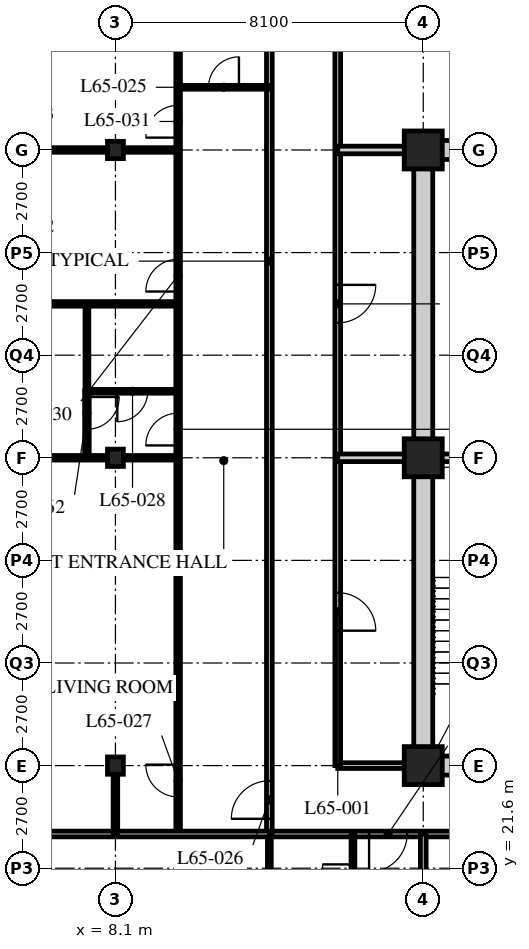
"""IFC4 building model, lengths in metres.
Left out: names, types, materials, properties, quantities, classifications, styles, units other than length and angle.
Written with IfcOpenShell. Run it as: python <this file> out.ifc"""

import sys

from ifc_helpers import new_model, si_unit, direction, frame, frame_2d, origin, origin_2d, place, context, subcontext, project, spatial, rectangle, hollow_rectangle, i_section, extrude, element, fill, save


model = new_model("IFC4")
c1 = context("Model", 3, precision=1e-05, world=origin(), true_north=direction((0.0, 1.0)))
c2 = subcontext(c1, "Body", "Model", "MODEL_VIEW")
j1 = project(units=[si_unit("LENGTHUNIT", "METRE"), si_unit("PLANEANGLEUNIT", "RADIAN")], contexts=[c1])
p1 = place(None, origin())
s1 = spatial("IfcSite", under=j1, at=p1, CompositionType="ELEMENT")
p2 = place(p1, origin())
s2 = spatial("IfcBuilding", under=s1, at=p2, CompositionType="ELEMENT")
p3 = place(p2, frame((0.0, 0.0, 254.1)))
s3 = spatial("IfcBuildingStorey", under=s2, at=p3, CompositionType="ELEMENT", Elevation=254.1)
for number, where, z_axis, x_axis in (
    (1, (8.1, 24.3, 0.0), (0.0, 0.0, 1.0), (1.0, 0.0, 0.0)),
    (2, (8.1, 32.4, 0.0), (0.0, 0.0, 1.0), (1.0, 0.0, 0.0)),
    (3, (8.1, 40.5, 0.0), (0.0, 0.0, 1.0), (1.0, 0.0, 0.0)),
):
    element("IfcColumn", number, at=place(p3, frame(where, z_axis=z_axis, x_axis=x_axis)), inside=s3, PredefinedType="COLUMN", context=c2, shape_type="SweptSolid", body=[
        extrude(i_section(OverallWidth=0.418, OverallDepth=0.456, WebThickness=0.042, FlangeThickness=0.067, FilletRadius=0.015, at=origin_2d()), origin(), (0.0, 0.0, 1.0), 3.9),
    ])
for number, where, z_axis, x_axis in (
    (4, (16.2, 24.3, 0.0), (0.0, 0.0, 1.0), (1.0, 0.0, 0.0)),
    (5, (16.2, 32.4, 0.0), (0.0, 0.0, 1.0), (1.0, 0.0, 0.0)),
    (6, (16.2, 40.5, 0.0), (0.0, 0.0, 1.0), (1.0, 0.0, 0.0)),
):
    element("IfcColumn", number, at=place(p3, frame(where, z_axis=z_axis, x_axis=x_axis)), inside=s3, PredefinedType="COLUMN", context=c2, shape_type="SweptSolid", body=[
        extrude(hollow_rectangle(XDim=1.0, YDim=1.0, WallThickness=0.1, at=origin_2d()), origin(), (0.0, 0.0, 1.0), 3.9),
    ])
p4 = place(p3, frame((12.15, 22.5, 0.0), z_axis=(0.0, 0.0, 1.0), x_axis=(1.0, 0.0, 0.0)))
e7 = element("IfcWall", 7, at=p4, inside=s3, PredefinedType="PARTITIONING", context=c2, shape_type="SweptSolid", body=[
    extrude(rectangle(XDim=24.3, YDim=0.15, at=frame_2d((12.15, 0.0))), origin(), (0.0, 0.0, 1.0), 3.69),
])
p5 = place(p4, frame((6.4, 0.0, 0.0)))
e8 = element("IfcOpeningElement", 8, at=p5, cuts=e7, PredefinedType="OPENING", context=c2, shape_type="SweptSolid", body=[
    extrude(rectangle(XDim=1.0, YDim=2.1, at=frame_2d((0.5, 1.05))), frame((0.0, 0.085, 0.0), z_axis=(0.0, -1.0, 0.0), x_axis=(1.0, 0.0, 0.0)), (0.0, 0.0, 1.0), 0.17),
])
p6 = place(p4, frame((8.5, 0.0, 0.0)))
e9 = element("IfcOpeningElement", 9, at=p6, cuts=e7, PredefinedType="OPENING", context=c2, shape_type="SweptSolid", body=[
    extrude(rectangle(XDim=1.0, YDim=2.1, at=frame_2d((0.5, 1.05))), frame((0.0, 0.085, 0.0), z_axis=(0.0, -1.0, 0.0), x_axis=(1.0, 0.0, 0.0)), (0.0, 0.0, 1.0), 0.17),
])
p7 = place(p4, frame((16.6, 0.0, 0.0)))
e10 = element("IfcOpeningElement", 10, at=p7, cuts=e7, PredefinedType="OPENING", context=c2, shape_type="SweptSolid", body=[
    extrude(rectangle(XDim=1.0, YDim=2.1, at=frame_2d((0.5, 1.05))), frame((0.0, 0.085, 0.0), z_axis=(0.0, -1.0, 0.0), x_axis=(1.0, 0.0, 0.0)), (0.0, 0.0, 1.0), 0.17),
])
p8 = place(p4, frame((2.625, 0.0, 0.0)))
e11 = element("IfcOpeningElement", 11, at=p8, cuts=e7, PredefinedType="OPENING", context=c2, shape_type="SweptSolid", body=[
    extrude(rectangle(XDim=1.0, YDim=2.1, at=frame_2d((0.5, 1.05))), frame((0.0, 0.085, 0.0), z_axis=(0.0, -1.0, 0.0), x_axis=(1.0, 0.0, 0.0)), (0.0, 0.0, 1.0), 0.17),
])
p9 = place(p3, frame((12.15, 22.5, 0.0), z_axis=(0.0, 0.0, 1.0), x_axis=(0.0, 1.0, 0.0)))
e12 = element("IfcWall", 12, at=p9, inside=s3, PredefinedType="PARTITIONING", context=c2, shape_type="SweptSolid", body=[
    extrude(rectangle(XDim=30.15, YDim=0.15, at=frame_2d((15.075, 0.0))), origin(), (0.0, 0.0, 1.0), 3.69),
])
p10 = place(p9, frame((0.4, 0.0, 0.0)))
e13 = element("IfcOpeningElement", 13, at=p10, cuts=e12, PredefinedType="OPENING", context=c2, shape_type="SweptSolid", body=[
    extrude(rectangle(XDim=1.0, YDim=2.1, at=frame_2d((0.5, 1.05))), frame((0.0, 0.085, 0.0), z_axis=(0.0, -1.0, 0.0), x_axis=(1.0, 0.0, 0.0)), (0.0, 0.0, 1.0), 0.17),
])
p11 = place(p9, frame((24.4, 0.0, 0.0)))
e14 = element("IfcOpeningElement", 14, at=p11, cuts=e12, PredefinedType="OPENING", context=c2, shape_type="SweptSolid", body=[
    extrude(rectangle(XDim=1.0, YDim=2.1, at=frame_2d((0.5, 1.05))), frame((0.0, 0.085, 0.0), z_axis=(0.0, -1.0, 0.0), x_axis=(1.0, 0.0, 0.0)), (0.0, 0.0, 1.0), 0.17),
])
p12 = place(p9, frame((28.45, 0.0, 0.0)))
e15 = element("IfcOpeningElement", 15, at=p12, cuts=e12, PredefinedType="OPENING", context=c2, shape_type="SweptSolid", body=[
    extrude(rectangle(XDim=1.0, YDim=2.1, at=frame_2d((0.5, 1.05))), frame((0.0, 0.085, 0.0), z_axis=(0.0, -1.0, 0.0), x_axis=(1.0, 0.0, 0.0)), (0.0, 0.0, 1.0), 0.17),
])
p13 = place(p3, frame((16.0, 24.3, 0.0), z_axis=(0.0, 0.0, 1.0), x_axis=(-1.0, 0.0, 0.0)))
e16 = element("IfcWall", 16, at=p13, inside=s3, PredefinedType="PARTITIONING", context=c2, shape_type="SweptSolid", body=[
    extrude(rectangle(XDim=2.05, YDim=0.15, at=frame_2d((1.025, 0.0))), origin(), (0.0, 0.0, 1.0), 3.078),
])
p14 = place(p3, frame((13.95, 24.3, 0.0), z_axis=(0.0, 0.0, 1.0), x_axis=(0.0, 1.0, 0.0)))
e17 = element("IfcWall", 17, at=p14, inside=s3, PredefinedType="PARTITIONING", context=c2, shape_type="SweptSolid", body=[
    extrude(rectangle(XDim=26.55, YDim=0.15, at=frame_2d((13.275, 0.0))), origin(), (0.0, 0.0, 1.0), 3.69),
])
p15 = place(p14, frame((3.55, 0.0, 0.0)))
e18 = element("IfcOpeningElement", 18, at=p15, cuts=e17, PredefinedType="OPENING", context=c2, shape_type="SweptSolid", body=[
    extrude(rectangle(XDim=1.0, YDim=2.1, at=frame_2d((0.5, 1.05))), frame((0.0, 0.085, 0.0), z_axis=(0.0, -1.0, 0.0), x_axis=(1.0, 0.0, 0.0)), (0.0, 0.0, 1.0), 0.17),
])
p16 = place(p14, frame((11.65, 0.0, 0.0)))
e19 = element("IfcOpeningElement", 19, at=p16, cuts=e17, PredefinedType="OPENING", context=c2, shape_type="SweptSolid", body=[
    extrude(rectangle(XDim=1.0, YDim=2.1, at=frame_2d((0.5, 1.05))), frame((0.0, 0.085, 0.0), z_axis=(0.0, -1.0, 0.0), x_axis=(1.0, 0.0, 0.0)), (0.0, 0.0, 1.0), 0.17),
])
for number, where, z_axis, x_axis in (
    (20, (13.95, 32.4, 0.0), (0.0, 0.0, 1.0), (1.0, 0.0, 0.0)),
    (21, (13.95, 40.5, 0.0), (0.0, 0.0, 1.0), (1.0, 0.0, 0.0)),
):
    element("IfcWall", number, at=place(p3, frame(where, z_axis=z_axis, x_axis=x_axis)), inside=s3, PredefinedType="SOLIDWALL", context=c2, shape_type="SweptSolid", body=[
        extrude(rectangle(XDim=2.25, YDim=0.2, at=frame_2d((1.125, 0.0))), origin(), (0.0, 0.0, 1.0), 3.078),
    ])
p17 = place(p3, frame((9.75, 22.5, 0.0), z_axis=(0.0, 0.0, 1.0), x_axis=(0.0, 1.0, 0.0)))
e22 = element("IfcWall", 22, at=p17, inside=s3, PredefinedType="PARTITIONING", context=c2, shape_type="SweptSolid", body=[
    extrude(rectangle(XDim=22.05, YDim=0.12, at=frame_2d((11.025, 0.0))), origin(), (0.0, 0.0, 1.0), 3.69),
])
p18 = place(p17, frame((0.975, 0.0, 0.0)))
e23 = element("IfcOpeningElement", 23, at=p18, cuts=e22, PredefinedType="OPENING", context=c2, shape_type="SweptSolid", body=[
    extrude(rectangle(XDim=0.85, YDim=2.1, at=frame_2d((0.425, 1.05))), frame((0.0, 0.07, 0.0), z_axis=(0.0, -1.0, 0.0), x_axis=(1.0, 0.0, 0.0)), (0.0, 0.0, 1.0), 0.14),
])
p19 = place(p17, frame((10.225, 0.0, 0.0)))
e24 = element("IfcOpeningElement", 24, at=p19, cuts=e22, PredefinedType="OPENING", context=c2, shape_type="SweptSolid", body=[
    extrude(rectangle(XDim=0.85, YDim=2.1, at=frame_2d((0.425, 1.05))), frame((0.0, 0.07, 0.0), z_axis=(0.0, -1.0, 0.0), x_axis=(1.0, 0.0, 0.0)), (0.0, 0.0, 1.0), 0.14),
])
p20 = place(p17, frame((14.275, 0.0, 0.0)))
e25 = element("IfcOpeningElement", 25, at=p20, cuts=e22, PredefinedType="OPENING", context=c2, shape_type="SweptSolid", body=[
    extrude(rectangle(XDim=0.85, YDim=2.1, at=frame_2d((0.425, 1.05))), frame((0.0, 0.07, 0.0), z_axis=(0.0, -1.0, 0.0), x_axis=(1.0, 0.0, 0.0)), (0.0, 0.0, 1.0), 0.14),
])
p21 = place(p17, frame((18.325, 0.0, 0.0)))
e26 = element("IfcOpeningElement", 26, at=p21, cuts=e22, PredefinedType="OPENING", context=c2, shape_type="SweptSolid", body=[
    extrude(rectangle(XDim=0.85, YDim=2.1, at=frame_2d((0.425, 1.05))), frame((0.0, 0.07, 0.0), z_axis=(0.0, -1.0, 0.0), x_axis=(1.0, 0.0, 0.0)), (0.0, 0.0, 1.0), 0.14),
])
p22 = place(p3, frame((12.15, 42.15, 0.0), z_axis=(0.0, 0.0, 1.0), x_axis=(-1.0, 0.0, 0.0)))
e27 = element("IfcWall", 27, at=p22, inside=s3, PredefinedType="PARTITIONING", context=c2, shape_type="SweptSolid", body=[
    extrude(rectangle(XDim=2.4, YDim=0.1, at=frame_2d((1.2, 0.0))), origin(), (0.0, 0.0, 1.0), 3.69),
])
p23 = place(p22, frame((0.8, 0.0, 0.0)))
e28 = element("IfcOpeningElement", 28, at=p23, cuts=e27, PredefinedType="OPENING", context=c2, shape_type="SweptSolid", body=[
    extrude(rectangle(XDim=0.8, YDim=2.1, at=frame_2d((0.4, 1.05))), frame((0.0, 0.06, 0.0), z_axis=(0.0, -1.0, 0.0), x_axis=(1.0, 0.0, 0.0)), (0.0, 0.0, 1.0), 0.12),
])
p24 = place(p3, frame((9.75, 34.15, 0.0), z_axis=(0.0, 0.0, 1.0), x_axis=(-1.0, 0.0, 0.0)))
e29 = element("IfcWall", 29, at=p24, inside=s3, PredefinedType="PARTITIONING", context=c2, shape_type="SweptSolid", body=[
    extrude(rectangle(XDim=2.4, YDim=0.1, at=frame_2d((1.2, 0.0))), origin(), (0.0, 0.0, 1.0), 3.69),
])
p25 = place(p24, frame((0.8, 0.0, 0.0)))
e30 = element("IfcOpeningElement", 30, at=p25, cuts=e29, PredefinedType="OPENING", context=c2, shape_type="SweptSolid", body=[
    extrude(rectangle(XDim=0.8, YDim=2.1, at=frame_2d((0.4, 1.05))), frame((0.0, 0.06, 0.0), z_axis=(0.0, -1.0, 0.0), x_axis=(1.0, 0.0, 0.0)), (0.0, 0.0, 1.0), 0.12),
])
p26 = place(p3, frame((7.35, 34.15, 0.0), z_axis=(0.0, 0.0, 1.0), x_axis=(0.0, 1.0, 0.0)))
e31 = element("IfcWall", 31, at=p26, inside=s3, PredefinedType="PARTITIONING", context=c2, shape_type="SweptSolid", body=[
    extrude(rectangle(XDim=2.3, YDim=0.1, at=frame_2d((1.15, 0.0))), origin(), (0.0, 0.0, 1.0), 3.69),
])
p27 = place(p3, frame((9.75, 32.4, 0.0), z_axis=(0.0, 0.0, 1.0), x_axis=(-1.0, 0.0, 0.0)))
e32 = element("IfcWall", 32, at=p27, inside=s3, PredefinedType="PARTITIONING", context=c2, shape_type="SweptSolid", body=[
    extrude(rectangle(XDim=9.45, YDim=0.12, at=frame_2d((4.725, 0.0))), origin(), (0.0, 0.0, 1.0), 3.078),
])
p28 = place(p3, frame((9.75, 36.45, 0.0), z_axis=(0.0, 0.0, 1.0), x_axis=(-1.0, 0.0, 0.0)))
e33 = element("IfcWall", 33, at=p28, inside=s3, PredefinedType="PARTITIONING", context=c2, shape_type="SweptSolid", body=[
    extrude(rectangle(XDim=9.45, YDim=0.12, at=frame_2d((4.725, 0.0))), origin(), (0.0, 0.0, 1.0), 3.69),
])
p29 = place(p3, frame((9.75, 40.5, 0.0), z_axis=(0.0, 0.0, 1.0), x_axis=(-1.0, 0.0, 0.0)))
e34 = element("IfcWall", 34, at=p29, inside=s3, PredefinedType="PARTITIONING", context=c2, shape_type="SweptSolid", body=[
    extrude(rectangle(XDim=9.45, YDim=0.12, at=frame_2d((4.725, 0.0))), origin(), (0.0, 0.0, 1.0), 3.078),
])
p30 = place(p3, frame((14.35, 22.5, 0.0), z_axis=(0.0, 0.0, 1.0), x_axis=(0.0, -1.0, 0.0)))
e35 = element("IfcWall", 35, at=p30, inside=s3, PredefinedType="PARTITIONING", context=c2, shape_type="SweptSolid", body=[
    extrude(rectangle(XDim=2.4, YDim=0.1, at=frame_2d((1.2, 0.0))), origin(), (0.0, 0.0, 1.0), 3.69),
])
p31 = place(p30, frame((0.8, 0.0, 0.0)))
e36 = element("IfcOpeningElement", 36, at=p31, cuts=e35, PredefinedType="OPENING", context=c2, shape_type="SweptSolid", body=[
    extrude(rectangle(XDim=0.8, YDim=2.1, at=frame_2d((0.4, 1.05))), frame((0.0, 0.06, 0.0), z_axis=(0.0, -1.0, 0.0), x_axis=(1.0, 0.0, 0.0)), (0.0, 0.0, 1.0), 0.12),
])
p32 = place(p3, frame((12.15, 22.5, 0.0), z_axis=(0.0, 0.0, 1.0), x_axis=(0.0, -1.0, 0.0)))
e37 = element("IfcWall", 37, at=p32, inside=s3, PredefinedType="PARTITIONING", context=c2, shape_type="SweptSolid", body=[
    extrude(rectangle(XDim=2.4, YDim=0.1, at=frame_2d((1.2, 0.0))), origin(), (0.0, 0.0, 1.0), 3.69),
])
p33 = place(p3, frame((4.35, 22.5, 0.0), z_axis=(0.0, 0.0, 1.0), x_axis=(1.0, 0.0, 0.0)))
e38 = element("IfcWall", 38, at=p33, inside=s3, PredefinedType="PARTITIONING", context=c2, shape_type="SweptSolid", body=[
    extrude(rectangle(XDim=7.8, YDim=0.15, at=frame_2d((3.9, 0.0))), origin(), (0.0, 0.0, 1.0), 3.69),
])
p34 = place(p3, frame((16.2, 22.5, 0.0), z_axis=(0.0, 0.0, 1.0), x_axis=(0.0, -1.0, 0.0)))
e39 = element("IfcWall", 39, at=p34, inside=s3, PredefinedType="PARTITIONING", context=c2, shape_type="SweptSolid", body=[
    extrude(rectangle(XDim=6.0, YDim=0.15, at=frame_2d((3.0, 0.0))), origin(), (0.0, 0.0, 1.0), 3.078),
])
p35 = place(p3, frame((7.35, 32.4, 0.0), z_axis=(0.0, 0.0, 1.0), x_axis=(0.0, 1.0, 0.0)))
e40 = element("IfcWall", 40, at=p35, inside=s3, PredefinedType="PARTITIONING", context=c2, shape_type="SweptSolid", body=[
    extrude(rectangle(XDim=1.76, YDim=0.12, at=frame_2d((0.88, 0.0))), origin(), (0.0, 0.0, 1.0), 3.69),
])
p36 = place(p35, frame((0.75, 0.0, 0.0)))
e41 = element("IfcOpeningElement", 41, at=p36, cuts=e40, PredefinedType="OPENING", context=c2, shape_type="SweptSolid", body=[
    extrude(rectangle(XDim=0.85, YDim=2.1, at=frame_2d((0.425, 1.05))), frame((0.0, 0.07, 0.0), z_axis=(0.0, -1.0, 0.0), x_axis=(1.0, 0.0, 0.0)), (0.0, 0.0, 1.0), 0.14),
])
p37 = place(p3, frame((8.1, 22.5, 0.0), z_axis=(0.0, 0.0, 1.0), x_axis=(0.0, 1.0, 0.0)))
e42 = element("IfcWall", 42, at=p37, inside=s3, PredefinedType="PARTITIONING", context=c2, shape_type="SweptSolid", body=[
    extrude(rectangle(XDim=1.597, YDim=0.12, at=frame_2d((0.798, 0.0))), origin(), (0.0, 0.0, 1.0), 3.078),
])
p38 = place(p3, frame((15.95, 24.3, 0.0), z_axis=(0.0, 0.0, 1.0), x_axis=(1.0, 0.0, 0.0)))
e43 = element("IfcWall", 43, at=p38, inside=s3, PredefinedType="SOLIDWALL", context=c2, shape_type="SweptSolid", body=[
    extrude(rectangle(XDim=24.55, YDim=0.5, at=frame_2d((12.275, 0.0))), origin(), (0.0, 0.0, 1.0), 3.04),
])
p39 = place(p38, frame((11.5, 0.0, 0.0)))
e44 = element("IfcOpeningElement", 44, at=p39, cuts=e43, PredefinedType="OPENING", context=c2, shape_type="SweptSolid", body=[
    extrude(rectangle(XDim=1.8, YDim=2.4, at=frame_2d((0.9, 1.2))), frame((0.0, 0.26, 0.0), z_axis=(0.0, -1.0, 0.0), x_axis=(1.0, 0.0, 0.0)), (0.0, 0.0, 1.0), 0.52),
])
p40 = place(p3, frame((15.95, 40.5, 0.0), z_axis=(0.0, 0.0, 1.0), x_axis=(1.0, 0.0, 0.0)))
e45 = element("IfcWall", 45, at=p40, inside=s3, PredefinedType="SOLIDWALL", context=c2, shape_type="SweptSolid", body=[
    extrude(rectangle(XDim=24.55, YDim=0.5, at=frame_2d((12.275, 0.0))), origin(), (0.0, 0.0, 1.0), 3.04),
])
p41 = place(p40, frame((11.5, 0.0, 0.0)))
e46 = element("IfcOpeningElement", 46, at=p41, cuts=e45, PredefinedType="OPENING", context=c2, shape_type="SweptSolid", body=[
    extrude(rectangle(XDim=1.8, YDim=2.4, at=frame_2d((0.9, 1.2))), frame((0.0, 0.26, 0.0), z_axis=(0.0, -1.0, 0.0), x_axis=(1.0, 0.0, 0.0)), (0.0, 0.0, 1.0), 0.52),
])
p42 = place(p3, frame((16.2, 24.55, 0.0), z_axis=(0.0, 0.0, 1.0), x_axis=(0.0, 1.0, 0.0)))
e47 = element("IfcWall", 47, at=p42, inside=s3, PredefinedType="SOLIDWALL", context=c2, shape_type="SweptSolid", body=[
    extrude(rectangle(XDim=15.7, YDim=0.5, at=frame_2d((7.85, 0.0))), origin(), (0.0, 0.0, 1.0), 3.078),
])
p43 = place(p3, frame((16.45, 32.4, 0.0), z_axis=(0.0, 0.0, 1.0), x_axis=(1.0, 0.0, 0.0)))
e48 = element("IfcWall", 48, at=p43, inside=s3, PredefinedType="SOLIDWALL", context=c2, shape_type="SweptSolid", body=[
    extrude(rectangle(XDim=7.95, YDim=0.2, at=frame_2d((3.975, 0.0))), origin(), (0.0, 0.0, 1.0), 3.078),
])
p44 = place(p15, origin())
e49 = element("IfcDoor", 49, at=p44, inside=s3, OperationType="SINGLE_SWING_RIGHT", PredefinedType="DOOR", context=c2, shape_type="SweptSolid", body=[
    extrude(rectangle(XDim=1.0, YDim=2.1, at=frame_2d((0.5, 1.05))), frame((0.0, 0.025, 0.0), z_axis=(0.0, -1.0, 0.0), x_axis=(1.0, 0.0, 0.0)), (0.0, 0.0, 1.0), 0.05),
])
fill(e18, e49)
p45 = place(p16, origin())
e50 = element("IfcDoor", 50, at=p45, inside=s3, OperationType="SINGLE_SWING_LEFT", PredefinedType="DOOR", context=c2, shape_type="SweptSolid", body=[
    extrude(rectangle(XDim=1.0, YDim=2.1, at=frame_2d((0.5, 1.05))), frame((0.0, 0.025, 0.0), z_axis=(0.0, -1.0, 0.0), x_axis=(1.0, 0.0, 0.0)), (0.0, 0.0, 1.0), 0.05),
])
fill(e19, e50)
p46 = place(p23, origin())
e51 = element("IfcDoor", 51, at=p46, inside=s3, OperationType="SINGLE_SWING_RIGHT", PredefinedType="DOOR", context=c2, shape_type="SweptSolid", body=[
    extrude(rectangle(XDim=0.8, YDim=2.1, at=frame_2d((0.4, 1.05))), frame((0.0, 0.025, 0.0), z_axis=(0.0, -1.0, 0.0), x_axis=(1.0, 0.0, 0.0)), (0.0, 0.0, 1.0), 0.05),
])
fill(e28, e51)
p47 = place(p10, origin())
e52 = element("IfcDoor", 52, at=p47, inside=s3, OperationType="SINGLE_SWING_LEFT", PredefinedType="DOOR", context=c2, shape_type="SweptSolid", body=[
    extrude(rectangle(XDim=1.0, YDim=2.1, at=frame_2d((0.5, 1.05))), frame((0.0, 0.025, 0.0), z_axis=(0.0, -1.0, 0.0), x_axis=(1.0, 0.0, 0.0)), (0.0, 0.0, 1.0), 0.05),
])
fill(e13, e52)
p48 = place(p18, origin())
e53 = element("IfcDoor", 53, at=p48, inside=s3, OperationType="SINGLE_SWING_RIGHT", PredefinedType="DOOR", context=c2, shape_type="SweptSolid", body=[
    extrude(rectangle(XDim=0.85, YDim=2.1, at=frame_2d((0.425, 1.05))), frame((0.0, 0.025, 0.0), z_axis=(0.0, -1.0, 0.0), x_axis=(1.0, 0.0, 0.0)), (0.0, 0.0, 1.0), 0.05),
])
fill(e23, e53)
p49 = place(p25, origin())
e54 = element("IfcDoor", 54, at=p49, inside=s3, OperationType="SINGLE_SWING_RIGHT", PredefinedType="DOOR", context=c2, shape_type="SweptSolid", body=[
    extrude(rectangle(XDim=0.8, YDim=2.1, at=frame_2d((0.4, 1.05))), frame((0.0, 0.025, 0.0), z_axis=(0.0, -1.0, 0.0), x_axis=(1.0, 0.0, 0.0)), (0.0, 0.0, 1.0), 0.05),
])
fill(e30, e54)
p50 = place(p19, origin())
e55 = element("IfcDoor", 55, at=p50, inside=s3, OperationType="SINGLE_SWING_LEFT", PredefinedType="DOOR", context=c2, shape_type="SweptSolid", body=[
    extrude(rectangle(XDim=0.85, YDim=2.1, at=frame_2d((0.425, 1.05))), frame((0.0, 0.025, 0.0), z_axis=(0.0, -1.0, 0.0), x_axis=(1.0, 0.0, 0.0)), (0.0, 0.0, 1.0), 0.05),
])
fill(e24, e55)
p51 = place(p20, origin())
e56 = element("IfcDoor", 56, at=p51, inside=s3, OperationType="SINGLE_SWING_LEFT", PredefinedType="DOOR", context=c2, shape_type="SweptSolid", body=[
    extrude(rectangle(XDim=0.85, YDim=2.1, at=frame_2d((0.425, 1.05))), frame((0.0, 0.025, 0.0), z_axis=(0.0, -1.0, 0.0), x_axis=(1.0, 0.0, 0.0)), (0.0, 0.0, 1.0), 0.05),
])
fill(e25, e56)
p52 = place(p21, origin())
e57 = element("IfcDoor", 57, at=p52, inside=s3, OperationType="SINGLE_SWING_LEFT", PredefinedType="DOOR", context=c2, shape_type="SweptSolid", body=[
    extrude(rectangle(XDim=0.85, YDim=2.1, at=frame_2d((0.425, 1.05))), frame((0.0, 0.025, 0.0), z_axis=(0.0, -1.0, 0.0), x_axis=(1.0, 0.0, 0.0)), (0.0, 0.0, 1.0), 0.05),
])
fill(e26, e57)
p53 = place(p31, origin())
e58 = element("IfcDoor", 58, at=p53, inside=s3, OperationType="SINGLE_SWING_RIGHT", PredefinedType="DOOR", context=c2, shape_type="SweptSolid", body=[
    extrude(rectangle(XDim=0.8, YDim=2.1, at=frame_2d((0.4, 1.05))), frame((0.0, 0.025, 0.0), z_axis=(0.0, -1.0, 0.0), x_axis=(1.0, 0.0, 0.0)), (0.0, 0.0, 1.0), 0.05),
])
fill(e36, e58)
p54 = place(p8, origin())
e59 = element("IfcDoor", 59, at=p54, inside=s3, OperationType="SINGLE_SWING_RIGHT", PredefinedType="DOOR", context=c2, shape_type="SweptSolid", body=[
    extrude(rectangle(XDim=1.0, YDim=2.1, at=frame_2d((0.5, 1.05))), frame((0.0, 0.025, 0.0), z_axis=(0.0, -1.0, 0.0), x_axis=(1.0, 0.0, 0.0)), (0.0, 0.0, 1.0), 0.05),
])
fill(e11, e59)
p55 = place(p36, origin())
e60 = element("IfcDoor", 60, at=p55, inside=s3, OperationType="SINGLE_SWING_LEFT", PredefinedType="DOOR", context=c2, shape_type="SweptSolid", body=[
    extrude(rectangle(XDim=0.85, YDim=2.1, at=frame_2d((0.425, 1.05))), frame((0.0, 0.025, 0.0), z_axis=(0.0, -1.0, 0.0), x_axis=(1.0, 0.0, 0.0)), (0.0, 0.0, 1.0), 0.05),
])
fill(e41, e60)
save(model, sys.argv[1])
